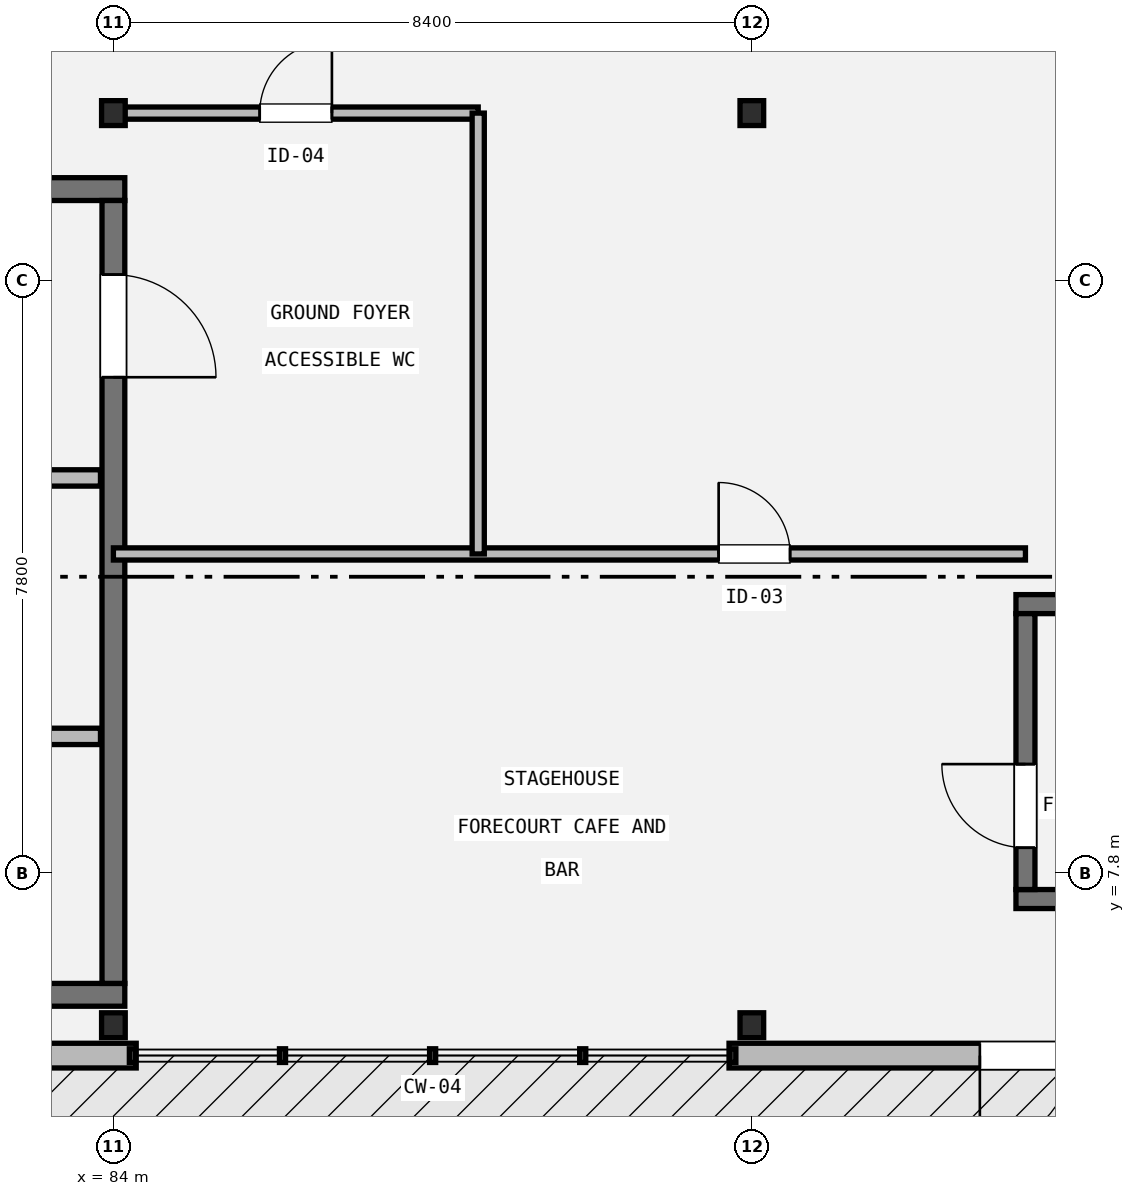
"""IFC4 building model, lengths in metres.
Left out: names, types, materials, properties, quantities, classifications, styles, units other than length and angle.
Written with IfcOpenShell. Run it as: python <this file> out.ifc"""

import sys

from ifc_helpers import new_model, si_unit, direction, frame, frame_2d, origin, origin_2d, place, context, subcontext, project, spatial, rectangle, i_section, extrude, element, fill, save


model = new_model("IFC4")
c1 = context("Model", 3, precision=1e-05, world=origin(), true_north=direction((0.0, 1.0)))
c2 = subcontext(c1, "Body", "Model", "MODEL_VIEW")
j1 = project(units=[si_unit("LENGTHUNIT", "METRE"), si_unit("PLANEANGLEUNIT", "RADIAN")], contexts=[c1])
p1 = place(None, origin())
s1 = spatial("IfcSite", under=j1, at=p1, CompositionType="ELEMENT")
p2 = place(p1, origin())
s2 = spatial("IfcBuilding", under=s1, at=p2, CompositionType="ELEMENT")
p3 = place(p2, origin())
s3 = spatial("IfcBuildingStorey", under=s2, at=p3, CompositionType="ELEMENT", Elevation=0.0)
for number, where, z_axis, x_axis in (
    (1, (84.0, 5.8, 0.0), (0.0, 0.0, 1.0), (1.0, 0.0, 0.0)),
    (2, (84.0, 17.8, 0.0), (0.0, 0.0, 1.0), (1.0, 0.0, 0.0)),
    (3, (92.4, 5.8, 0.0), (0.0, 0.0, 1.0), (1.0, 0.0, 0.0)),
    (4, (92.4, 17.8, 0.0), (0.0, 0.0, 1.0), (1.0, 0.0, 0.0)),
):
    element("IfcColumn", number, at=place(p3, frame(where, z_axis=z_axis, x_axis=x_axis)), inside=s3, PredefinedType="COLUMN", context=c2, shape_type="SweptSolid", body=[
        extrude(i_section(OverallWidth=0.311, OverallDepth=0.327, WebThickness=0.016, FlangeThickness=0.025, FilletRadius=0.015, at=origin_2d()), origin(), (0.0, 0.0, 1.0), 5.4),
    ])
p4 = place(p3, frame((84.3, 5.4, 0.0), z_axis=(0.0, 0.0, 1.0), x_axis=(-1.0, 0.0, 0.0)))
e5 = element("IfcWall", 5, at=p4, inside=s3, PredefinedType="STANDARD", context=c2, shape_type="SweptSolid", body=[
    extrude(rectangle(XDim=8.7, YDim=0.325, at=frame_2d((4.35, 0.0))), origin(), (0.0, 0.0, 1.0), 4.662),
])
p5 = place(p3, frame((100.8, 5.4, 0.0), z_axis=(0.0, 0.0, 1.0), x_axis=(-1.0, 0.0, 0.0)))
e6 = element("IfcWall", 6, at=p5, inside=s3, PredefinedType="STANDARD", context=c2, shape_type="SweptSolid", body=[
    extrude(rectangle(XDim=8.7, YDim=0.325, at=frame_2d((4.35, 0.0))), origin(), (0.0, 0.0, 1.0), 4.792),
])
p6 = place(p5, frame((3.0, 0.0, 0.0)))
e7 = element("IfcOpeningElement", 7, at=p6, cuts=e6, PredefinedType="OPENING", context=c2, shape_type="SweptSolid", body=[
    extrude(rectangle(XDim=2.4, YDim=2.6, at=frame_2d((1.2, 1.3))), frame((0.0, 0.172, 0.0), z_axis=(0.0, -1.0, 0.0), x_axis=(1.0, 0.0, 0.0)), (0.0, 0.0, 1.0), 0.345),
])
for number, where, z_axis, x_axis in (
    (8, (106.285, 7.46, 0.0), (0.0, 0.0, 1.0), (-1.0, 0.0, 0.0)),
    (9, (95.875, 11.34, 0.0), (0.0, 0.0, 1.0), (1.0, 0.0, 0.0)),
):
    element("IfcWall", number, at=place(p3, frame(where, z_axis=z_axis, x_axis=x_axis)), inside=s3, PredefinedType="SHEAR", context=c2, shape_type="SweptSolid", body=[
        extrude(rectangle(XDim=10.41, YDim=0.25, at=frame_2d((5.205, 0.0))), origin(), (0.0, 0.0, 1.0), 5.18),
    ])
p7 = place(p3, frame((96.0, 7.585, 0.0), z_axis=(0.0, 0.0, 1.0), x_axis=(0.0, 1.0, 0.0)))
e10 = element("IfcWall", 10, at=p7, inside=s3, PredefinedType="SHEAR", context=c2, shape_type="SweptSolid", body=[
    extrude(rectangle(XDim=3.63, YDim=0.25, at=frame_2d((1.815, 0.0))), origin(), (0.0, 0.0, 1.0), 5.18),
])
p8 = place(p7, frame((0.55, 0.0, 0.0)))
e11 = element("IfcOpeningElement", 11, at=p8, cuts=e10, PredefinedType="OPENING", context=c2, shape_type="SweptSolid", body=[
    extrude(rectangle(XDim=1.1, YDim=2.15, at=frame_2d((0.55, 1.075))), frame((0.0, 0.135, 0.0), z_axis=(0.0, -1.0, 0.0), x_axis=(1.0, 0.0, 0.0)), (0.0, 0.0, 1.0), 0.27),
])
for number, where, z_axis, x_axis in (
    (12, (84.15, 6.2, 0.0), (0.0, 0.0, 1.0), (-1.0, 0.0, 0.0)),
    (13, (75.65, 16.8, 0.0), (0.0, 0.0, 1.0), (1.0, 0.0, 0.0)),
):
    element("IfcWall", number, at=place(p3, frame(where, z_axis=z_axis, x_axis=x_axis)), inside=s3, PredefinedType="SHEAR", context=c2, shape_type="SweptSolid", body=[
        extrude(rectangle(XDim=8.5, YDim=0.3, at=frame_2d((4.25, 0.0))), origin(), (0.0, 0.0, 1.0), 5.18),
    ])
p9 = place(p3, frame((84.0, 16.65, 0.0), z_axis=(0.0, 0.0, 1.0), x_axis=(0.0, -1.0, 0.0)))
e14 = element("IfcWall", 14, at=p9, inside=s3, PredefinedType="SHEAR", context=c2, shape_type="SweptSolid", body=[
    extrude(rectangle(XDim=10.3, YDim=0.3, at=frame_2d((5.15, 0.0))), origin(), (0.0, 0.0, 1.0), 5.18),
])
p10 = place(p9, frame((0.975, 0.0, 0.0)))
e15 = element("IfcOpeningElement", 15, at=p10, cuts=e14, PredefinedType="OPENING", context=c2, shape_type="SweptSolid", body=[
    extrude(rectangle(XDim=1.35, YDim=2.15, at=frame_2d((0.675, 1.075))), frame((0.0, 0.16, 0.0), z_axis=(0.0, -1.0, 0.0), x_axis=(1.0, 0.0, 0.0)), (0.0, 0.0, 1.0), 0.32),
])
p11 = place(p3, frame((79.98, 9.6, 0.0), z_axis=(0.0, 0.0, 1.0), x_axis=(1.0, 0.0, 0.0)))
e16 = element("IfcWall", 16, at=p11, inside=s3, PredefinedType="STANDARD", context=c2, shape_type="SweptSolid", body=[
    extrude(rectangle(XDim=3.85, YDim=0.215, at=frame_2d((1.925, 0.0))), origin(), (0.0, 0.0, 1.0), 4.555),
])
p12 = place(p11, frame((1.4, 0.0, 0.0)))
e17 = element("IfcOpeningElement", 17, at=p12, cuts=e16, PredefinedType="OPENING", context=c2, shape_type="SweptSolid", body=[
    extrude(rectangle(XDim=1.05, YDim=2.15, at=frame_2d((0.525, 1.075))), frame((0.0, 0.117, 0.0), z_axis=(0.0, -1.0, 0.0), x_axis=(1.0, 0.0, 0.0)), (0.0, 0.0, 1.0), 0.235),
])
p13 = place(p3, frame((79.98, 13.0, 0.0), z_axis=(0.0, 0.0, 1.0), x_axis=(1.0, 0.0, 0.0)))
e18 = element("IfcWall", 18, at=p13, inside=s3, PredefinedType="STANDARD", context=c2, shape_type="SweptSolid", body=[
    extrude(rectangle(XDim=3.85, YDim=0.215, at=frame_2d((1.925, 0.0))), origin(), (0.0, 0.0, 1.0), 4.555),
])
p14 = place(p13, frame((1.4, 0.0, 0.0)))
e19 = element("IfcOpeningElement", 19, at=p14, cuts=e18, PredefinedType="OPENING", context=c2, shape_type="SweptSolid", body=[
    extrude(rectangle(XDim=1.05, YDim=2.15, at=frame_2d((0.525, 1.075))), frame((0.0, 0.117, 0.0), z_axis=(0.0, -1.0, 0.0), x_axis=(1.0, 0.0, 0.0)), (0.0, 0.0, 1.0), 0.235),
])
p15 = place(p3, frame((84.0, 12.0, 0.0), z_axis=(0.0, 0.0, 1.0), x_axis=(1.0, 0.0, 0.0)))
e20 = element("IfcWall", 20, at=p15, inside=s3, PredefinedType="PLUMBINGWALL", context=c2, shape_type="SweptSolid", body=[
    extrude(rectangle(XDim=12.0, YDim=0.16, at=frame_2d((6.0, 0.0))), origin(), (0.0, 0.0, 1.0), 4.555),
])
p16 = place(p15, frame((7.963, 0.0, 0.0)))
e21 = element("IfcOpeningElement", 21, at=p16, cuts=e20, PredefinedType="OPENING", context=c2, shape_type="SweptSolid", body=[
    extrude(rectangle(XDim=0.94, YDim=2.1, at=frame_2d((0.47, 1.05))), frame((0.0, 0.09, 0.0), z_axis=(0.0, -1.0, 0.0), x_axis=(1.0, 0.0, 0.0)), (0.0, 0.0, 1.0), 0.18),
])
p17 = place(p3, frame((84.0, 17.8, 0.0), z_axis=(0.0, 0.0, 1.0), x_axis=(1.0, 0.0, 0.0)))
e22 = element("IfcWall", 22, at=p17, inside=s3, PredefinedType="PLUMBINGWALL", context=c2, shape_type="SweptSolid", body=[
    extrude(rectangle(XDim=4.8, YDim=0.16, at=frame_2d((2.4, 0.0))), origin(), (0.0, 0.0, 1.0), 4.555),
])
p18 = place(p17, frame((1.925, 0.0, 0.0)))
e23 = element("IfcOpeningElement", 23, at=p18, cuts=e22, PredefinedType="OPENING", context=c2, shape_type="SweptSolid", body=[
    extrude(rectangle(XDim=0.95, YDim=2.1, at=frame_2d((0.475, 1.05))), frame((0.0, 0.09, 0.0), z_axis=(0.0, -1.0, 0.0), x_axis=(1.0, 0.0, 0.0)), (0.0, 0.0, 1.0), 0.18),
])
p19 = place(p3, frame((88.8, 12.0, 0.0), z_axis=(0.0, 0.0, 1.0), x_axis=(0.0, 1.0, 0.0)))
e24 = element("IfcWall", 24, at=p19, inside=s3, PredefinedType="PLUMBINGWALL", context=c2, shape_type="SweptSolid", body=[
    extrude(rectangle(XDim=5.8, YDim=0.16, at=frame_2d((2.9, 0.0))), origin(), (0.0, 0.0, 1.0), 4.639),
])
p20 = place(p6, origin())
e25 = element("IfcDoor", 25, at=p20, inside=s3, OperationType="DOUBLE_SWING_RIGHT", PredefinedType="DOOR", context=c2, shape_type="SweptSolid", body=[
    extrude(rectangle(XDim=2.4, YDim=2.6, at=frame_2d((1.2, 1.3))), frame((0.0, 0.025, 0.0), z_axis=(0.0, -1.0, 0.0), x_axis=(1.0, 0.0, 0.0)), (0.0, 0.0, 1.0), 0.05),
])
fill(e7, e25)
p21 = place(p8, origin())
e26 = element("IfcDoor", 26, at=p21, inside=s3, OperationType="SINGLE_SWING_RIGHT", PredefinedType="DOOR", context=c2, shape_type="SweptSolid", body=[
    extrude(rectangle(XDim=1.1, YDim=2.15, at=frame_2d((0.55, 1.075))), frame((0.0, 0.025, 0.0), z_axis=(0.0, -1.0, 0.0), x_axis=(1.0, 0.0, 0.0)), (0.0, 0.0, 1.0), 0.05),
])
fill(e11, e26)
p22 = place(p10, origin())
e27 = element("IfcDoor", 27, at=p22, inside=s3, OperationType="SINGLE_SWING_RIGHT", PredefinedType="DOOR", context=c2, shape_type="SweptSolid", body=[
    extrude(rectangle(XDim=1.35, YDim=2.15, at=frame_2d((0.675, 1.075))), frame((0.0, 0.025, 0.0), z_axis=(0.0, -1.0, 0.0), x_axis=(1.0, 0.0, 0.0)), (0.0, 0.0, 1.0), 0.05),
])
fill(e15, e27)
p23 = place(p16, origin())
e28 = element("IfcDoor", 28, at=p23, inside=s3, OperationType="SINGLE_SWING_LEFT", PredefinedType="DOOR", context=c2, shape_type="SweptSolid", body=[
    extrude(rectangle(XDim=0.94, YDim=2.1, at=frame_2d((0.47, 1.05))), frame((0.0, 0.025, 0.0), z_axis=(0.0, -1.0, 0.0), x_axis=(1.0, 0.0, 0.0)), (0.0, 0.0, 1.0), 0.05),
])
fill(e21, e28)
p24 = place(p18, origin())
e29 = element("IfcDoor", 29, at=p24, inside=s3, OperationType="SINGLE_SWING_RIGHT", PredefinedType="DOOR", context=c2, shape_type="SweptSolid", body=[
    extrude(rectangle(XDim=0.95, YDim=2.1, at=frame_2d((0.475, 1.05))), frame((0.0, 0.025, 0.0), z_axis=(0.0, -1.0, 0.0), x_axis=(1.0, 0.0, 0.0)), (0.0, 0.0, 1.0), 0.05),
])
fill(e23, e29)
save(model, sys.argv[1])
